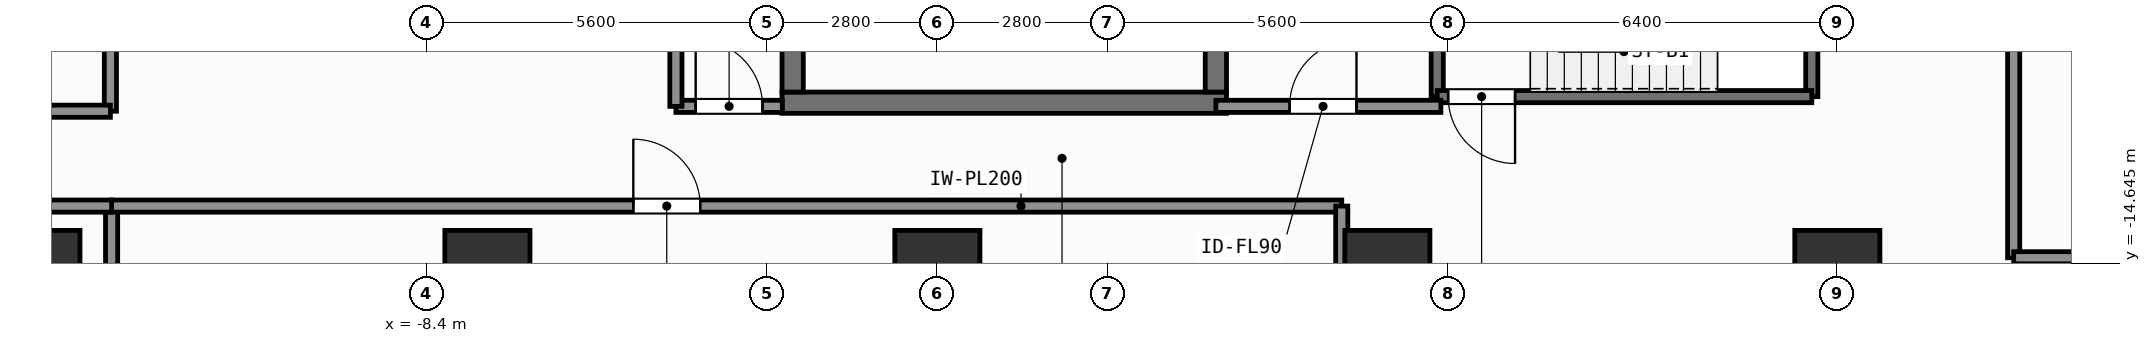
"""IFC4 building model, lengths in metres.
Left out: names, types, materials, properties, quantities, classifications, styles, units other than length and angle.
Written with IfcOpenShell. Run it as: python <this file> out.ifc"""

import sys

from ifc_helpers import new_model, si_unit, direction, frame, frame_2d, origin, origin_2d, place, context, subcontext, project, spatial, rectangle, extrude, element, fill, save


model = new_model("IFC4")
c1 = context("Model", 3, precision=1e-05, world=origin(), true_north=direction((0.0, 1.0)))
c2 = subcontext(c1, "Body", "Model", "MODEL_VIEW")
j1 = project(units=[si_unit("LENGTHUNIT", "METRE"), si_unit("PLANEANGLEUNIT", "RADIAN")], contexts=[c1])
p1 = place(None, origin())
s1 = spatial("IfcSite", under=j1, at=p1, CompositionType="ELEMENT")
p2 = place(p1, origin())
s2 = spatial("IfcBuilding", under=s1, at=p2, CompositionType="ELEMENT")
p3 = place(p2, frame((0.0, 0.0, -4.2)))
s3 = spatial("IfcBuildingStorey", under=s2, at=p3, CompositionType="ELEMENT", Elevation=-4.2)
p4 = place(p3, frame((-2.555, -12.0, 0.0), z_axis=(0.0, 0.0, 1.0), x_axis=(1.0, 0.0, 0.0)))
e1 = element("IfcWall", 1, at=p4, inside=s3, PredefinedType="SHEAR", context=c2, shape_type="SweptSolid", body=[
    extrude(rectangle(XDim=7.31, YDim=0.35, at=frame_2d((3.655, 0.0))), origin(), (0.0, 0.0, 1.0), 4.2),
])
p5 = place(p3, frame((-2.38, -11.825, 0.0), z_axis=(0.0, 0.0, 1.0), x_axis=(0.0, 1.0, 0.0)))
e2 = element("IfcWall", 2, at=p5, inside=s3, PredefinedType="SHEAR", context=c2, shape_type="SweptSolid", body=[
    extrude(rectangle(XDim=2.925, YDim=0.35, at=frame_2d((1.462, 0.0))), origin(), (0.0, 0.0, 1.0), 4.2),
])
p6 = place(p3, frame((4.58, -8.9, 0.0), z_axis=(0.0, 0.0, 1.0), x_axis=(0.0, -1.0, 0.0)))
e3 = element("IfcWall", 3, at=p6, inside=s3, PredefinedType="SHEAR", context=c2, shape_type="SweptSolid", body=[
    extrude(rectangle(XDim=2.925, YDim=0.35, at=frame_2d((1.462, 0.0))), origin(), (0.0, 0.0, 1.0), 4.2),
])
p7 = place(p6, frame((0.913, 0.0, 0.0)))
e4 = element("IfcOpeningElement", 4, at=p7, cuts=e3, PredefinedType="OPENING", context=c2, shape_type="SweptSolid", body=[
    extrude(rectangle(XDim=1.1, YDim=2.15, at=frame_2d((0.55, 1.075))), frame((0.0, 0.185, 0.0), z_axis=(0.0, -1.0, 0.0), x_axis=(1.0, 0.0, 0.0)), (0.0, 0.0, 1.0), 0.37),
])
for number, where, z_axis, x_axis in (
    (5, (-14.8, -14.8, 0.0), (0.0, 0.0, 1.0), (1.0, 0.0, 0.0)),
    (6, (-7.4, -14.8, 0.0), (0.0, 0.0, 1.0), (1.0, 0.0, 0.0)),
    (7, (0.0, -14.8, 0.0), (0.0, 0.0, 1.0), (1.0, 0.0, 0.0)),
    (8, (7.4, -14.8, 0.0), (0.0, 0.0, 1.0), (1.0, 0.0, 0.0)),
    (9, (14.8, -14.8, 0.0), (0.0, 0.0, 1.0), (1.0, 0.0, 0.0)),
):
    element("IfcColumn", number, at=place(p3, frame(where, z_axis=z_axis, x_axis=x_axis)), inside=s3, PredefinedType="COLUMN", context=c2, shape_type="SweptSolid", body=[
        extrude(rectangle(XDim=1.4, YDim=1.4, at=origin_2d()), origin(), (0.0, 0.0, 1.0), 4.2),
    ])
for number, where, z_axis, x_axis in (
    (10, (8.22, -11.9, 0.0), (0.0, 0.0, 1.0), (0.0, 1.0, 0.0)),
    (11, (14.38, -8.94, 0.0), (0.0, 0.0, 1.0), (0.0, -1.0, 0.0)),
):
    element("IfcWall", number, at=place(p3, frame(where, z_axis=z_axis, x_axis=x_axis)), inside=s3, PredefinedType="SHEAR", context=c2, shape_type="SweptSolid", body=[
        extrude(rectangle(XDim=2.96, YDim=0.2, at=frame_2d((1.48, 0.0))), origin(), (0.0, 0.0, 1.0), 3.9),
    ])
p8 = place(p3, frame((14.38, -11.9, 0.0), z_axis=(0.0, 0.0, 1.0), x_axis=(-1.0, 0.0, 0.0)))
e12 = element("IfcWall", 12, at=p8, inside=s3, PredefinedType="SHEAR", context=c2, shape_type="SweptSolid", body=[
    extrude(rectangle(XDim=6.16, YDim=0.2, at=frame_2d((3.08, 0.0))), origin(), (0.0, 0.0, 1.0), 3.9),
])
p9 = place(p8, frame((4.88, 0.0, 0.0)))
e13 = element("IfcOpeningElement", 13, at=p9, cuts=e12, PredefinedType="OPENING", context=c2, shape_type="SweptSolid", body=[
    extrude(rectangle(XDim=1.1, YDim=2.15, at=frame_2d((0.55, 1.075))), frame((0.0, 0.11, 0.0), z_axis=(0.0, -1.0, 0.0), x_axis=(1.0, 0.0, 0.0)), (0.0, 0.0, 1.0), 0.22),
])
p10 = place(p3, frame((4.58, -12.06, 0.0), z_axis=(0.0, 0.0, 1.0), x_axis=(1.0, 0.0, 0.0)))
e14 = element("IfcWall", 14, at=p10, inside=s3, PredefinedType="SOLIDWALL", context=c2, shape_type="SweptSolid", body=[
    extrude(rectangle(XDim=3.7, YDim=0.2, at=frame_2d((1.85, 0.0))), origin(), (0.0, 0.0, 1.0), 3.9),
])
p11 = place(p10, frame((1.212, 0.0, 0.0)))
e15 = element("IfcOpeningElement", 15, at=p11, cuts=e14, PredefinedType="OPENING", context=c2, shape_type="SweptSolid", body=[
    extrude(rectangle(XDim=1.1, YDim=2.15, at=frame_2d((0.55, 1.075))), frame((0.0, 0.11, 0.0), z_axis=(0.0, -1.0, 0.0), x_axis=(1.0, 0.0, 0.0)), (0.0, 0.0, 1.0), 0.22),
])
p12 = place(p3, frame((-4.3, -12.06, 0.0), z_axis=(0.0, 0.0, 1.0), x_axis=(1.0, 0.0, 0.0)))
e16 = element("IfcWall", 16, at=p12, inside=s3, PredefinedType="SOLIDWALL", context=c2, shape_type="SweptSolid", body=[
    extrude(rectangle(XDim=1.75, YDim=0.2, at=frame_2d((0.875, 0.0))), origin(), (0.0, 0.0, 1.0), 3.9),
])
p13 = place(p12, frame((0.325, 0.0, 0.0)))
e17 = element("IfcOpeningElement", 17, at=p13, cuts=e16, PredefinedType="OPENING", context=c2, shape_type="SweptSolid", body=[
    extrude(rectangle(XDim=1.1, YDim=2.15, at=frame_2d((0.55, 1.075))), frame((0.0, 0.11, 0.0), z_axis=(0.0, -1.0, 0.0), x_axis=(1.0, 0.0, 0.0)), (0.0, 0.0, 1.0), 0.22),
])
p14 = place(p3, frame((-13.6, -12.14, 0.0), z_axis=(0.0, 0.0, 1.0), x_axis=(0.0, 1.0, 0.0)))
e18 = element("IfcWall", 18, at=p14, inside=s3, PredefinedType="SOLIDWALL", context=c2, shape_type="SweptSolid", body=[
    extrude(rectangle(XDim=16.64, YDim=0.2, at=frame_2d((8.32, 0.0))), origin(), (0.0, 0.0, 1.0), 3.9),
])
p15 = place(p14, frame((6.964, 0.0, 0.0)))
e19 = element("IfcOpeningElement", 19, at=p15, cuts=e18, PredefinedType="OPENING", context=c2, shape_type="SweptSolid", body=[
    extrude(rectangle(XDim=1.1, YDim=2.15, at=frame_2d((0.55, 1.075))), frame((0.0, 0.11, 0.0), z_axis=(0.0, -1.0, 0.0), x_axis=(1.0, 0.0, 0.0)), (0.0, 0.0, 1.0), 0.22),
])
p16 = place(p3, frame((17.7, -14.55, 0.0), z_axis=(0.0, 0.0, 1.0), x_axis=(0.0, 1.0, 0.0)))
e20 = element("IfcWall", 20, at=p16, inside=s3, PredefinedType="SOLIDWALL", context=c2, shape_type="SweptSolid", body=[
    extrude(rectangle(XDim=28.25, YDim=0.2, at=frame_2d((14.125, 0.0))), origin(), (0.0, 0.0, 1.0), 3.9),
])
p17 = place(p16, frame((15.006, 0.0, 0.0)))
e21 = element("IfcOpeningElement", 21, at=p17, cuts=e20, PredefinedType="OPENING", context=c2, shape_type="SweptSolid", body=[
    extrude(rectangle(XDim=1.1, YDim=2.15, at=frame_2d((0.55, 1.075))), frame((0.0, 0.11, 0.0), z_axis=(0.0, -1.0, 0.0), x_axis=(1.0, 0.0, 0.0)), (0.0, 0.0, 1.0), 0.22),
])
p18 = place(p3, frame((-13.58, -24.15, 0.0), z_axis=(0.0, 0.0, 1.0), x_axis=(0.0, 1.0, 0.0)))
e22 = element("IfcWall", 22, at=p18, inside=s3, PredefinedType="SOLIDWALL", context=c2, shape_type="SweptSolid", body=[
    extrude(rectangle(XDim=10.45, YDim=0.2, at=frame_2d((5.225, 0.0))), origin(), (0.0, 0.0, 1.0), 3.9),
])
p19 = place(p18, frame((4.763, 0.0, 0.0)))
e23 = element("IfcOpeningElement", 23, at=p19, cuts=e22, PredefinedType="OPENING", context=c2, shape_type="SweptSolid", body=[
    extrude(rectangle(XDim=1.1, YDim=2.15, at=frame_2d((0.55, 1.075))), frame((0.0, 0.11, 0.0), z_axis=(0.0, -1.0, 0.0), x_axis=(1.0, 0.0, 0.0)), (0.0, 0.0, 1.0), 0.22),
])
p20 = place(p3, frame((-13.58, -13.7, 0.0), z_axis=(0.0, 0.0, 1.0), x_axis=(1.0, 0.0, 0.0)))
e24 = element("IfcWall", 24, at=p20, inside=s3, PredefinedType="SOLIDWALL", context=c2, shape_type="SweptSolid", body=[
    extrude(rectangle(XDim=20.23, YDim=0.2, at=frame_2d((10.115, 0.0))), origin(), (0.0, 0.0, 1.0), 3.9),
])
p21 = place(p20, frame((8.58, 0.0, 0.0)))
e25 = element("IfcOpeningElement", 25, at=p21, cuts=e24, PredefinedType="OPENING", context=c2, shape_type="SweptSolid", body=[
    extrude(rectangle(XDim=1.1, YDim=2.15, at=frame_2d((0.55, 1.075))), frame((0.0, 0.11, 0.0), z_axis=(0.0, -1.0, 0.0), x_axis=(1.0, 0.0, 0.0)), (0.0, 0.0, 1.0), 0.22),
])
p22 = place(p3, frame((-4.3, -12.06, 0.0), z_axis=(0.0, 0.0, 1.0), x_axis=(0.0, 1.0, 0.0)))
e26 = element("IfcWall", 26, at=p22, inside=s3, PredefinedType="SOLIDWALL", context=c2, shape_type="SweptSolid", body=[
    extrude(rectangle(XDim=3.11, YDim=0.2, at=frame_2d((1.555, 0.0))), origin(), (0.0, 0.0, 1.0), 3.9),
])
p23 = place(p3, frame((-32.65, -12.14, 0.0), z_axis=(0.0, 0.0, 1.0), x_axis=(1.0, 0.0, 0.0)))
e27 = element("IfcWall", 27, at=p23, inside=s3, PredefinedType="SOLIDWALL", context=c2, shape_type="SweptSolid", body=[
    extrude(rectangle(XDim=19.05, YDim=0.2, at=frame_2d((9.525, 0.0))), origin(), (0.0, 0.0, 1.0), 3.9),
])
p24 = place(p3, frame((17.7, -14.55, 0.0), z_axis=(0.0, 0.0, 1.0), x_axis=(1.0, 0.0, 0.0)))
e28 = element("IfcWall", 28, at=p24, inside=s3, PredefinedType="SOLIDWALL", context=c2, shape_type="SweptSolid", body=[
    extrude(rectangle(XDim=14.95, YDim=0.2, at=frame_2d((7.475, 0.0))), origin(), (0.0, 0.0, 1.0), 2.99),
])
p25 = place(p3, frame((-32.65, -13.7, 0.0), z_axis=(0.0, 0.0, 1.0), x_axis=(1.0, 0.0, 0.0)))
e29 = element("IfcWall", 29, at=p25, inside=s3, PredefinedType="SOLIDWALL", context=c2, shape_type="SweptSolid", body=[
    extrude(rectangle(XDim=19.07, YDim=0.2, at=frame_2d((9.535, 0.0))), origin(), (0.0, 0.0, 1.0), 3.9),
])
p26 = place(p3, frame((6.65, -24.15, 0.0), z_axis=(0.0, 0.0, 1.0), x_axis=(0.0, 1.0, 0.0)))
e30 = element("IfcWall", 30, at=p26, inside=s3, PredefinedType="SOLIDWALL", context=c2, shape_type="SweptSolid", body=[
    extrude(rectangle(XDim=10.45, YDim=0.2, at=frame_2d((5.225, 0.0))), origin(), (0.0, 0.0, 1.0), 3.9),
])
p27 = place(p9, origin())
e31 = element("IfcDoor", 31, at=p27, inside=s3, OperationType="SINGLE_SWING_LEFT", PredefinedType="DOOR", context=c2, shape_type="SweptSolid", body=[
    extrude(rectangle(XDim=1.1, YDim=2.15, at=frame_2d((0.55, 1.075))), frame((0.0, 0.025, 0.0), z_axis=(0.0, -1.0, 0.0), x_axis=(1.0, 0.0, 0.0)), (0.0, 0.0, 1.0), 0.05),
])
fill(e13, e31)
p28 = place(p11, origin())
e32 = element("IfcDoor", 32, at=p28, inside=s3, OperationType="SINGLE_SWING_RIGHT", PredefinedType="DOOR", context=c2, shape_type="SweptSolid", body=[
    extrude(rectangle(XDim=1.1, YDim=2.15, at=frame_2d((0.55, 1.075))), frame((0.0, 0.025, 0.0), z_axis=(0.0, -1.0, 0.0), x_axis=(1.0, 0.0, 0.0)), (0.0, 0.0, 1.0), 0.05),
])
fill(e15, e32)
p29 = place(p13, origin())
e33 = element("IfcDoor", 33, at=p29, inside=s3, OperationType="SINGLE_SWING_LEFT", PredefinedType="DOOR", context=c2, shape_type="SweptSolid", body=[
    extrude(rectangle(XDim=1.1, YDim=2.15, at=frame_2d((0.55, 1.075))), frame((0.0, 0.025, 0.0), z_axis=(0.0, -1.0, 0.0), x_axis=(1.0, 0.0, 0.0)), (0.0, 0.0, 1.0), 0.05),
])
fill(e17, e33)
p30 = place(p21, origin())
e34 = element("IfcDoor", 34, at=p30, inside=s3, OperationType="SINGLE_SWING_LEFT", PredefinedType="DOOR", context=c2, shape_type="SweptSolid", body=[
    extrude(rectangle(XDim=1.1, YDim=2.15, at=frame_2d((0.55, 1.075))), frame((0.0, 0.025, 0.0), z_axis=(0.0, -1.0, 0.0), x_axis=(1.0, 0.0, 0.0)), (0.0, 0.0, 1.0), 0.05),
])
fill(e25, e34)
save(model, sys.argv[1])
